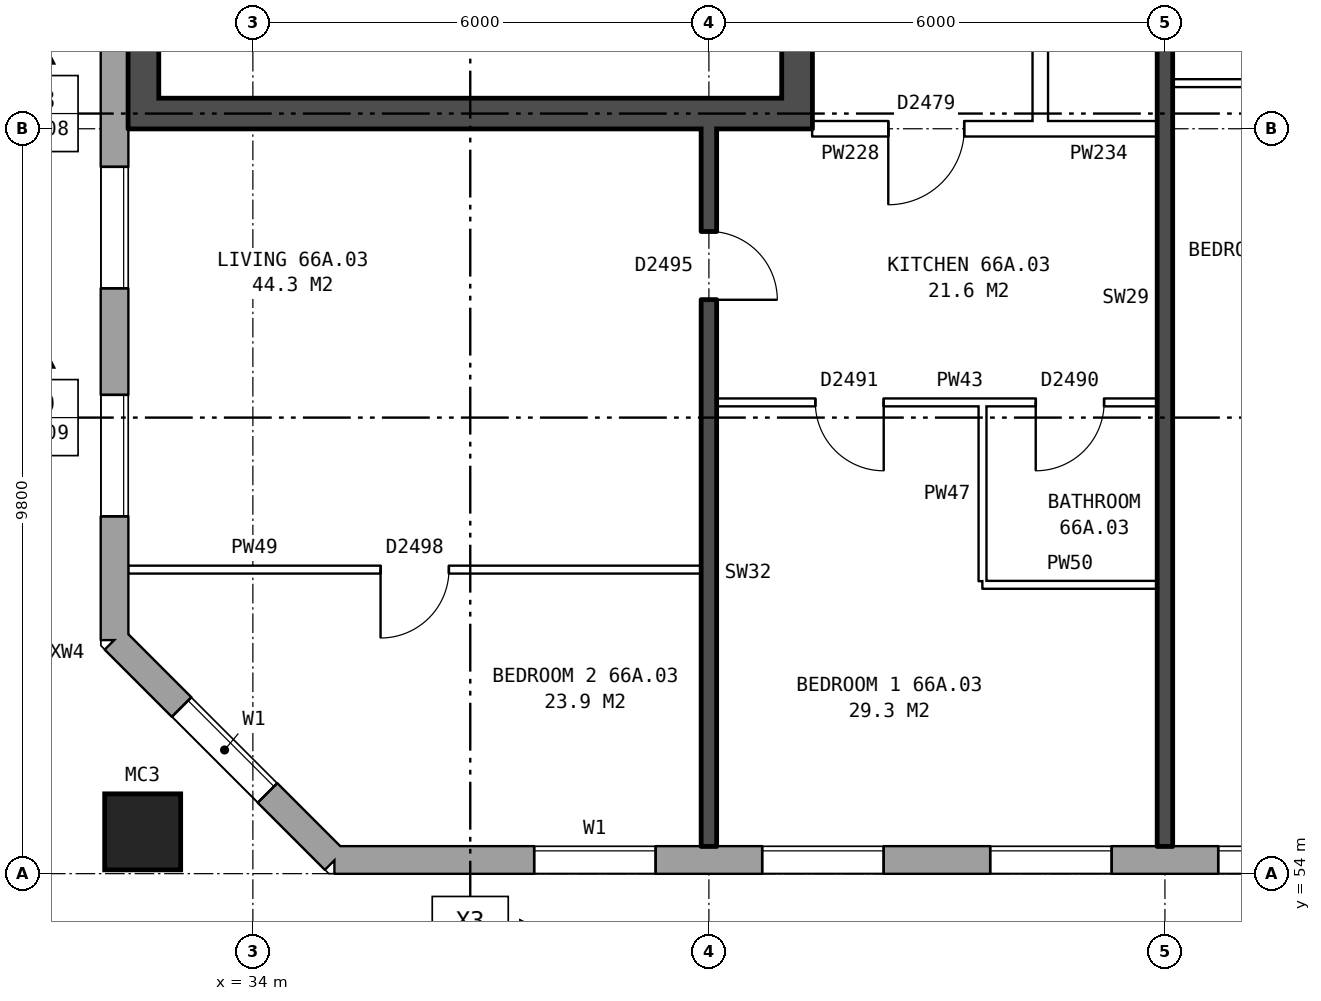
"""IFC4 building model, lengths in metres.
Left out: names, types, materials, properties, quantities, classifications, styles, units other than length and angle.
Written with IfcOpenShell. Run it as: python <this file> out.ifc"""

import sys

from ifc_helpers import new_model, si_unit, direction, frame, frame_2d, origin, origin_2d, place, context, subcontext, project, spatial, rectangle, hollow_rectangle, extrude, element, fill, save


model = new_model("IFC4")
c1 = context("Model", 3, precision=1e-05, world=origin(), true_north=direction((0.0, 1.0)))
c2 = subcontext(c1, "Body", "Model", "MODEL_VIEW")
j1 = project(units=[si_unit("LENGTHUNIT", "METRE"), si_unit("PLANEANGLEUNIT", "RADIAN")], contexts=[c1])
p1 = place(None, origin())
s1 = spatial("IfcSite", under=j1, at=p1, CompositionType="ELEMENT")
p2 = place(p1, origin())
s2 = spatial("IfcBuilding", under=s1, at=p2, CompositionType="ELEMENT")
p3 = place(p2, frame((0.0, 0.0, 233.8)))
s3 = spatial("IfcBuildingStorey", under=s2, at=p3, CompositionType="ELEMENT", Elevation=233.8)
p4 = place(p3, frame((32.55, 54.55, 0.0), z_axis=(0.0, 0.0, 1.0), x_axis=(1.0, 0.0, 0.0)))
e1 = element("IfcColumn", 1, at=p4, inside=s3, PredefinedType="COLUMN", context=c2, shape_type="SweptSolid", body=[
    extrude(hollow_rectangle(XDim=1.0, YDim=1.0, WallThickness=0.055, at=origin_2d()), origin(), (0.0, 0.0, 1.0), 3.1),
])
p5 = place(p3, frame((32.18, 57.075, 0.0), z_axis=(0.0, 0.0, 1.0), x_axis=(0.707106781187, -0.707106781187, 0.0)))
e2 = element("IfcWall", 2, at=p5, inside=s3, PredefinedType="STANDARD", context=c2, shape_type="SweptSolid", body=[
    extrude(rectangle(XDim=4.094, YDim=0.36, at=frame_2d((2.047, 0.0))), origin(), (0.0, 0.0, 1.0), 2.85),
])
p6 = place(p5, frame((1.247, 0.0, 0.8)))
e3 = element("IfcOpeningElement", 3, at=p6, cuts=e2, PredefinedType="OPENING", context=c2, shape_type="SweptSolid", body=[
    extrude(rectangle(XDim=1.6, YDim=1.8, at=frame_2d((0.8, 0.9))), frame((0.0, 0.19, 0.0), z_axis=(0.0, -1.0, 0.0), x_axis=(1.0, 0.0, 0.0)), (0.0, 0.0, 1.0), 0.38),
])
p7 = place(p3, frame((35.075, 54.18, 0.0), z_axis=(0.0, 0.0, 1.0), x_axis=(1.0, 0.0, 0.0)))
e4 = element("IfcWall", 4, at=p7, inside=s3, PredefinedType="STANDARD", context=c2, shape_type="SweptSolid", body=[
    extrude(rectangle(XDim=39.875, YDim=0.36, at=frame_2d((19.938, 0.0))), origin(), (0.0, 0.0, 1.0), 2.85),
])
p8 = place(p7, frame((2.625, 0.0, 0.8)))
e5 = element("IfcOpeningElement", 5, at=p8, cuts=e4, PredefinedType="OPENING", context=c2, shape_type="SweptSolid", body=[
    extrude(rectangle(XDim=1.6, YDim=1.8, at=frame_2d((0.8, 0.9))), frame((0.0, 0.19, 0.0), z_axis=(0.0, -1.0, 0.0), x_axis=(1.0, 0.0, 0.0)), (0.0, 0.0, 1.0), 0.38),
])
p9 = place(p7, frame((5.625, 0.0, 0.8)))
e6 = element("IfcOpeningElement", 6, at=p9, cuts=e4, PredefinedType="OPENING", context=c2, shape_type="SweptSolid", body=[
    extrude(rectangle(XDim=1.6, YDim=1.8, at=frame_2d((0.8, 0.9))), frame((0.0, 0.19, 0.0), z_axis=(0.0, -1.0, 0.0), x_axis=(1.0, 0.0, 0.0)), (0.0, 0.0, 1.0), 0.38),
])
p10 = place(p7, frame((8.625, 0.0, 0.8)))
e7 = element("IfcOpeningElement", 7, at=p10, cuts=e4, PredefinedType="OPENING", context=c2, shape_type="SweptSolid", body=[
    extrude(rectangle(XDim=1.6, YDim=1.8, at=frame_2d((0.8, 0.9))), frame((0.0, 0.19, 0.0), z_axis=(0.0, -1.0, 0.0), x_axis=(1.0, 0.0, 0.0)), (0.0, 0.0, 1.0), 0.38),
])
p11 = place(p7, frame((11.625, 0.0, 0.8)))
e8 = element("IfcOpeningElement", 8, at=p11, cuts=e4, PredefinedType="OPENING", context=c2, shape_type="SweptSolid", body=[
    extrude(rectangle(XDim=1.6, YDim=1.8, at=frame_2d((0.8, 0.9))), frame((0.0, 0.19, 0.0), z_axis=(0.0, -1.0, 0.0), x_axis=(1.0, 0.0, 0.0)), (0.0, 0.0, 1.0), 0.38),
])
p12 = place(p7, frame((14.625, 0.0, 0.8)))
e9 = element("IfcOpeningElement", 9, at=p12, cuts=e4, PredefinedType="OPENING", context=c2, shape_type="SweptSolid", body=[
    extrude(rectangle(XDim=1.6, YDim=1.8, at=frame_2d((0.8, 0.9))), frame((0.0, 0.19, 0.0), z_axis=(0.0, -1.0, 0.0), x_axis=(1.0, 0.0, 0.0)), (0.0, 0.0, 1.0), 0.38),
])
p13 = place(p7, frame((18.475, 0.0, 0.15)))
e10 = element("IfcOpeningElement", 10, at=p13, cuts=e4, PredefinedType="OPENING", context=c2, shape_type="SweptSolid", body=[
    extrude(rectangle(XDim=0.8, YDim=0.9, at=frame_2d((0.4, 0.45))), frame((0.0, 0.19, 0.0), z_axis=(0.0, -1.0, 0.0), x_axis=(1.0, 0.0, 0.0)), (0.0, 0.0, 1.0), 0.38),
])
p14 = place(p7, frame((20.625, 0.0, 0.8)))
e11 = element("IfcOpeningElement", 11, at=p14, cuts=e4, PredefinedType="OPENING", context=c2, shape_type="SweptSolid", body=[
    extrude(rectangle(XDim=1.6, YDim=1.8, at=frame_2d((0.8, 0.9))), frame((0.0, 0.19, 0.0), z_axis=(0.0, -1.0, 0.0), x_axis=(1.0, 0.0, 0.0)), (0.0, 0.0, 1.0), 0.38),
])
p15 = place(p7, frame((23.625, 0.0, 0.8)))
e12 = element("IfcOpeningElement", 12, at=p15, cuts=e4, PredefinedType="OPENING", context=c2, shape_type="SweptSolid", body=[
    extrude(rectangle(XDim=1.6, YDim=1.8, at=frame_2d((0.8, 0.9))), frame((0.0, 0.19, 0.0), z_axis=(0.0, -1.0, 0.0), x_axis=(1.0, 0.0, 0.0)), (0.0, 0.0, 1.0), 0.38),
])
p16 = place(p7, frame((26.625, 0.0, 0.8)))
e13 = element("IfcOpeningElement", 13, at=p16, cuts=e4, PredefinedType="OPENING", context=c2, shape_type="SweptSolid", body=[
    extrude(rectangle(XDim=1.6, YDim=1.8, at=frame_2d((0.8, 0.9))), frame((0.0, 0.19, 0.0), z_axis=(0.0, -1.0, 0.0), x_axis=(1.0, 0.0, 0.0)), (0.0, 0.0, 1.0), 0.38),
])
p17 = place(p7, frame((29.625, 0.0, 0.8)))
e14 = element("IfcOpeningElement", 14, at=p17, cuts=e4, PredefinedType="OPENING", context=c2, shape_type="SweptSolid", body=[
    extrude(rectangle(XDim=1.6, YDim=1.8, at=frame_2d((0.8, 0.9))), frame((0.0, 0.19, 0.0), z_axis=(0.0, -1.0, 0.0), x_axis=(1.0, 0.0, 0.0)), (0.0, 0.0, 1.0), 0.38),
])
p18 = place(p7, frame((32.625, 0.0, 0.8)))
e15 = element("IfcOpeningElement", 15, at=p18, cuts=e4, PredefinedType="OPENING", context=c2, shape_type="SweptSolid", body=[
    extrude(rectangle(XDim=1.6, YDim=1.8, at=frame_2d((0.8, 0.9))), frame((0.0, 0.19, 0.0), z_axis=(0.0, -1.0, 0.0), x_axis=(1.0, 0.0, 0.0)), (0.0, 0.0, 1.0), 0.38),
])
p19 = place(p7, frame((35.625, 0.0, 0.8)))
e16 = element("IfcOpeningElement", 16, at=p19, cuts=e4, PredefinedType="OPENING", context=c2, shape_type="SweptSolid", body=[
    extrude(rectangle(XDim=1.6, YDim=1.8, at=frame_2d((0.8, 0.9))), frame((0.0, 0.19, 0.0), z_axis=(0.0, -1.0, 0.0), x_axis=(1.0, 0.0, 0.0)), (0.0, 0.0, 1.0), 0.38),
])
p20 = place(p3, frame((32.18, 82.925, 0.0), z_axis=(0.0, 0.0, 1.0), x_axis=(0.0, -1.0, 0.0)))
e17 = element("IfcWall", 17, at=p20, inside=s3, PredefinedType="STANDARD", context=c2, shape_type="SweptSolid", body=[
    extrude(rectangle(XDim=25.851, YDim=0.36, at=frame_2d((12.925, 0.0))), origin(), (0.0, 0.0, 1.0), 2.85),
])
p21 = place(p20, frame((1.625, 0.0, 0.8)))
e18 = element("IfcOpeningElement", 18, at=p21, cuts=e17, PredefinedType="OPENING", context=c2, shape_type="SweptSolid", body=[
    extrude(rectangle(XDim=1.6, YDim=1.8, at=frame_2d((0.8, 0.9))), frame((0.0, 0.19, 0.0), z_axis=(0.0, -1.0, 0.0), x_axis=(1.0, 0.0, 0.0)), (0.0, 0.0, 1.0), 0.38),
])
p22 = place(p20, frame((4.625, 0.0, 0.8)))
e19 = element("IfcOpeningElement", 19, at=p22, cuts=e17, PredefinedType="OPENING", context=c2, shape_type="SweptSolid", body=[
    extrude(rectangle(XDim=1.6, YDim=1.8, at=frame_2d((0.8, 0.9))), frame((0.0, 0.19, 0.0), z_axis=(0.0, -1.0, 0.0), x_axis=(1.0, 0.0, 0.0)), (0.0, 0.0, 1.0), 0.38),
])
p23 = place(p20, frame((19.625, 0.0, 0.8)))
e20 = element("IfcOpeningElement", 20, at=p23, cuts=e17, PredefinedType="OPENING", context=c2, shape_type="SweptSolid", body=[
    extrude(rectangle(XDim=1.6, YDim=1.8, at=frame_2d((0.8, 0.9))), frame((0.0, 0.19, 0.0), z_axis=(0.0, -1.0, 0.0), x_axis=(1.0, 0.0, 0.0)), (0.0, 0.0, 1.0), 0.38),
])
p24 = place(p20, frame((22.625, 0.0, 0.8)))
e21 = element("IfcOpeningElement", 21, at=p24, cuts=e17, PredefinedType="OPENING", context=c2, shape_type="SweptSolid", body=[
    extrude(rectangle(XDim=1.6, YDim=1.8, at=frame_2d((0.8, 0.9))), frame((0.0, 0.19, 0.0), z_axis=(0.0, -1.0, 0.0), x_axis=(1.0, 0.0, 0.0)), (0.0, 0.0, 1.0), 0.38),
])
p25 = place(p3, frame((41.16, 76.2, 0.0), z_axis=(0.0, 0.0, 1.0), x_axis=(0.0, -1.0, 0.0)))
e22 = element("IfcWall", 22, at=p25, inside=s3, PredefinedType="SHEAR", context=c2, shape_type="SweptSolid", body=[
    extrude(rectangle(XDim=12.4, YDim=0.4, at=frame_2d((6.2, 0.0))), origin(), (0.0, 0.0, 1.0), 2.85),
])
p26 = place(p25, frame((1.325, 0.0, 0.0)))
e23 = element("IfcOpeningElement", 23, at=p26, cuts=e22, PredefinedType="OPENING", context=c2, shape_type="SweptSolid", body=[
    extrude(rectangle(XDim=1.1, YDim=2.1, at=frame_2d((0.55, 1.05))), frame((0.0, 0.21, 0.0), z_axis=(0.0, -1.0, 0.0), x_axis=(1.0, 0.0, 0.0)), (0.0, 0.0, 1.0), 0.42),
])
p27 = place(p25, frame((4.225, 0.0, 0.0)))
e24 = element("IfcOpeningElement", 24, at=p27, cuts=e22, PredefinedType="OPENING", context=c2, shape_type="SweptSolid", body=[
    extrude(rectangle(XDim=0.85, YDim=2.1, at=frame_2d((0.425, 1.05))), frame((0.0, 0.21, 0.0), z_axis=(0.0, -1.0, 0.0), x_axis=(1.0, 0.0, 0.0)), (0.0, 0.0, 1.0), 0.42),
])
p28 = place(p25, frame((7.475, 0.0, 0.0)))
e25 = element("IfcOpeningElement", 25, at=p28, cuts=e22, PredefinedType="OPENING", context=c2, shape_type="SweptSolid", body=[
    extrude(rectangle(XDim=0.85, YDim=2.1, at=frame_2d((0.425, 1.05))), frame((0.0, 0.21, 0.0), z_axis=(0.0, -1.0, 0.0), x_axis=(1.0, 0.0, 0.0)), (0.0, 0.0, 1.0), 0.42),
])
p29 = place(p25, frame((9.9, 0.0, 0.0)))
e26 = element("IfcOpeningElement", 26, at=p29, cuts=e22, PredefinedType="OPENING", context=c2, shape_type="SweptSolid", body=[
    extrude(rectangle(XDim=1.1, YDim=2.1, at=frame_2d((0.55, 1.05))), frame((0.0, 0.21, 0.0), z_axis=(0.0, -1.0, 0.0), x_axis=(1.0, 0.0, 0.0)), (0.0, 0.0, 1.0), 0.42),
])
p30 = place(p3, frame((32.56, 76.2, 0.0), z_axis=(0.0, 0.0, 1.0), x_axis=(0.0, -1.0, 0.0)))
e27 = element("IfcWall", 27, at=p30, inside=s3, PredefinedType="SHEAR", context=c2, shape_type="SweptSolid", body=[
    extrude(rectangle(XDim=12.4, YDim=0.4, at=frame_2d((6.2, 0.0))), origin(), (0.0, 0.0, 1.0), 2.85),
])
p31 = place(p3, frame((40.96, 64.0, 0.0), z_axis=(0.0, 0.0, 1.0), x_axis=(-1.0, 0.0, 0.0)))
e28 = element("IfcWall", 28, at=p31, inside=s3, PredefinedType="SHEAR", context=c2, shape_type="SweptSolid", body=[
    extrude(rectangle(XDim=8.2, YDim=0.4, at=frame_2d((4.1, 0.0))), origin(), (0.0, 0.0, 1.0), 2.85),
])
p32 = place(p3, frame((44.36, 63.9, 0.0), z_axis=(0.0, 0.0, 1.0), x_axis=(0.0, 1.0, 0.0)))
e29 = element("IfcWall", 29, at=p32, inside=s3, PredefinedType="PARTITIONING", context=c2, shape_type="SweptSolid", body=[
    extrude(rectangle(XDim=12.2, YDim=0.2, at=frame_2d((6.1, 0.0))), origin(), (0.0, 0.0, 1.0), 2.85),
])
p33 = place(p32, frame((5.1, 0.0, 0.0)))
e30 = element("IfcOpeningElement", 30, at=p33, cuts=e29, PredefinedType="OPENING", context=c2, shape_type="SweptSolid", body=[
    extrude(rectangle(XDim=2.0, YDim=2.1, at=frame_2d((1.0, 1.05))), frame((0.0, 0.11, 0.0), z_axis=(0.0, -1.0, 0.0), x_axis=(1.0, 0.0, 0.0)), (0.0, 0.0, 1.0), 0.22),
])
p34 = place(p3, frame((43.6, 57.8, 0.0), z_axis=(0.0, 0.0, 1.0), x_axis=(1.0, 0.0, 0.0)))
e31 = element("IfcWall", 31, at=p34, inside=s3, PredefinedType="PARTITIONING", context=c2, shape_type="SweptSolid", body=[
    extrude(rectangle(XDim=2.3, YDim=0.1, at=frame_2d((1.15, 0.0))), origin(), (0.0, 0.0, 1.0), 2.85),
])
p35 = place(p3, frame((32.36, 58.0, 0.0), z_axis=(0.0, 0.0, 1.0), x_axis=(1.0, 0.0, 0.0)))
e32 = element("IfcWall", 32, at=p35, inside=s3, PredefinedType="PARTITIONING", context=c2, shape_type="SweptSolid", body=[
    extrude(rectangle(XDim=7.54, YDim=0.1, at=frame_2d((3.77, 0.0))), origin(), (0.0, 0.0, 1.0), 2.85),
])
p36 = place(p35, frame((3.32, 0.0, 0.0)))
e33 = element("IfcOpeningElement", 33, at=p36, cuts=e32, PredefinedType="OPENING", context=c2, shape_type="SweptSolid", body=[
    extrude(rectangle(XDim=0.9, YDim=2.1, at=frame_2d((0.45, 1.05))), frame((0.0, 0.06, 0.0), z_axis=(0.0, -1.0, 0.0), x_axis=(1.0, 0.0, 0.0)), (0.0, 0.0, 1.0), 0.12),
])
p37 = place(p3, frame((40.1, 60.2, 0.0), z_axis=(0.0, 0.0, 1.0), x_axis=(1.0, 0.0, 0.0)))
e34 = element("IfcWall", 34, at=p37, inside=s3, PredefinedType="PARTITIONING", context=c2, shape_type="SweptSolid", body=[
    extrude(rectangle(XDim=5.8, YDim=0.1, at=frame_2d((2.9, 0.0))), origin(), (0.0, 0.0, 1.0), 2.85),
])
p38 = place(p37, frame((1.3, 0.0, 0.0)))
e35 = element("IfcOpeningElement", 35, at=p38, cuts=e34, PredefinedType="OPENING", context=c2, shape_type="SweptSolid", body=[
    extrude(rectangle(XDim=0.9, YDim=2.1, at=frame_2d((0.45, 1.05))), frame((0.0, 0.06, 0.0), z_axis=(0.0, -1.0, 0.0), x_axis=(1.0, 0.0, 0.0)), (0.0, 0.0, 1.0), 0.12),
])
p39 = place(p37, frame((4.2, 0.0, 0.0)))
e36 = element("IfcOpeningElement", 36, at=p39, cuts=e34, PredefinedType="OPENING", context=c2, shape_type="SweptSolid", body=[
    extrude(rectangle(XDim=0.9, YDim=2.1, at=frame_2d((0.45, 1.05))), frame((0.0, 0.06, 0.0), z_axis=(0.0, -1.0, 0.0), x_axis=(1.0, 0.0, 0.0)), (0.0, 0.0, 1.0), 0.12),
])
p40 = place(p3, frame((41.36, 63.8, 0.0), z_axis=(0.0, 0.0, 1.0), x_axis=(1.0, 0.0, 0.0)))
e37 = element("IfcWall", 37, at=p40, inside=s3, PredefinedType="PARTITIONING", context=c2, shape_type="SweptSolid", body=[
    extrude(rectangle(XDim=3.0, YDim=0.2, at=frame_2d((1.5, 0.0))), origin(), (0.0, 0.0, 1.0), 2.85),
])
p41 = place(p40, frame((1.0, 0.0, 0.0)))
e38 = element("IfcOpeningElement", 38, at=p41, cuts=e37, PredefinedType="OPENING", context=c2, shape_type="SweptSolid", body=[
    extrude(rectangle(XDim=1.0, YDim=2.1, at=frame_2d((0.5, 1.05))), frame((0.0, 0.11, 0.0), z_axis=(0.0, -1.0, 0.0), x_axis=(1.0, 0.0, 0.0)), (0.0, 0.0, 1.0), 0.22),
])
p42 = place(p3, frame((44.36, 63.8, 0.0), z_axis=(0.0, 0.0, 1.0), x_axis=(1.0, 0.0, 0.0)))
e39 = element("IfcWall", 39, at=p42, inside=s3, PredefinedType="PARTITIONING", context=c2, shape_type="SweptSolid", body=[
    extrude(rectangle(XDim=1.54, YDim=0.2, at=frame_2d((0.77, 0.0))), origin(), (0.0, 0.0, 1.0), 2.85),
])
p43 = place(p3, frame((46.1, 64.4, 0.0), z_axis=(0.0, 0.0, 1.0), x_axis=(1.0, 0.0, 0.0)))
e40 = element("IfcWall", 40, at=p43, inside=s3, PredefinedType="PARTITIONING", context=c2, shape_type="SweptSolid", body=[
    extrude(rectangle(XDim=2.9, YDim=0.1, at=frame_2d((1.45, 0.0))), origin(), (0.0, 0.0, 1.0), 2.85),
])
p44 = place(p3, frame((40.0, 54.36, 0.0), z_axis=(0.0, 0.0, 1.0), x_axis=(0.0, 1.0, 0.0)))
e41 = element("IfcWall", 41, at=p44, inside=s3, PredefinedType="SOLIDWALL", context=c2, shape_type="SweptSolid", body=[
    extrude(rectangle(XDim=9.44, YDim=0.2, at=frame_2d((4.72, 0.0))), origin(), (0.0, 0.0, 1.0), 2.85),
])
p45 = place(p44, frame((7.19, 0.0, 0.0)))
e42 = element("IfcOpeningElement", 42, at=p45, cuts=e41, PredefinedType="OPENING", context=c2, shape_type="SweptSolid", body=[
    extrude(rectangle(XDim=0.9, YDim=2.1, at=frame_2d((0.45, 1.05))), frame((0.0, 0.11, 0.0), z_axis=(0.0, -1.0, 0.0), x_axis=(1.0, 0.0, 0.0)), (0.0, 0.0, 1.0), 0.22),
])
p46 = place(p3, frame((43.6, 57.85, 0.0), z_axis=(0.0, 0.0, 1.0), x_axis=(0.0, 1.0, 0.0)))
e43 = element("IfcWall", 43, at=p46, inside=s3, PredefinedType="PARTITIONING", context=c2, shape_type="SweptSolid", body=[
    extrude(rectangle(XDim=2.3, YDim=0.1, at=frame_2d((1.15, 0.0))), origin(), (0.0, 0.0, 1.0), 2.85),
])
p47 = place(p3, frame((46.0, 54.36, 0.0), z_axis=(0.0, 0.0, 1.0), x_axis=(0.0, 1.0, 0.0)))
e44 = element("IfcWall", 44, at=p47, inside=s3, PredefinedType="SOLIDWALL", context=c2, shape_type="SweptSolid", body=[
    extrude(rectangle(XDim=14.44, YDim=0.2, at=frame_2d((7.22, 0.0))), origin(), (0.0, 0.0, 1.0), 2.85),
])
p48 = place(p6, origin())
e45 = element("IfcWindow", 45, at=p48, inside=s3, PartitioningType="SINGLE_PANEL", PredefinedType="WINDOW", context=c2, shape_type="SweptSolid", body=[
    extrude(rectangle(XDim=1.6, YDim=1.8, at=frame_2d((0.8, 0.9))), frame((0.0, 0.15, 0.0), z_axis=(0.0, -1.0, 0.0), x_axis=(1.0, 0.0, 0.0)), (0.0, 0.0, 1.0), 0.06),
])
fill(e3, e45)
p49 = place(p8, origin())
e46 = element("IfcWindow", 46, at=p49, inside=s3, PartitioningType="SINGLE_PANEL", PredefinedType="WINDOW", context=c2, shape_type="SweptSolid", body=[
    extrude(rectangle(XDim=1.6, YDim=1.8, at=frame_2d((0.8, 0.9))), frame((0.0, 0.15, 0.0), z_axis=(0.0, -1.0, 0.0), x_axis=(1.0, 0.0, 0.0)), (0.0, 0.0, 1.0), 0.06),
])
fill(e5, e46)
p50 = place(p9, origin())
e47 = element("IfcWindow", 47, at=p50, inside=s3, PartitioningType="SINGLE_PANEL", PredefinedType="WINDOW", context=c2, shape_type="SweptSolid", body=[
    extrude(rectangle(XDim=1.6, YDim=1.8, at=frame_2d((0.8, 0.9))), frame((0.0, 0.15, 0.0), z_axis=(0.0, -1.0, 0.0), x_axis=(1.0, 0.0, 0.0)), (0.0, 0.0, 1.0), 0.06),
])
fill(e6, e47)
p51 = place(p10, origin())
e48 = element("IfcWindow", 48, at=p51, inside=s3, PartitioningType="SINGLE_PANEL", PredefinedType="WINDOW", context=c2, shape_type="SweptSolid", body=[
    extrude(rectangle(XDim=1.6, YDim=1.8, at=frame_2d((0.8, 0.9))), frame((0.0, 0.15, 0.0), z_axis=(0.0, -1.0, 0.0), x_axis=(1.0, 0.0, 0.0)), (0.0, 0.0, 1.0), 0.06),
])
fill(e7, e48)
p52 = place(p11, origin())
e49 = element("IfcWindow", 49, at=p52, inside=s3, PartitioningType="SINGLE_PANEL", PredefinedType="WINDOW", context=c2, shape_type="SweptSolid", body=[
    extrude(rectangle(XDim=1.6, YDim=1.8, at=frame_2d((0.8, 0.9))), frame((0.0, 0.15, 0.0), z_axis=(0.0, -1.0, 0.0), x_axis=(1.0, 0.0, 0.0)), (0.0, 0.0, 1.0), 0.06),
])
fill(e8, e49)
p53 = place(p23, origin())
e50 = element("IfcWindow", 50, at=p53, inside=s3, PartitioningType="SINGLE_PANEL", PredefinedType="WINDOW", context=c2, shape_type="SweptSolid", body=[
    extrude(rectangle(XDim=1.6, YDim=1.8, at=frame_2d((0.8, 0.9))), frame((0.0, 0.15, 0.0), z_axis=(0.0, -1.0, 0.0), x_axis=(1.0, 0.0, 0.0)), (0.0, 0.0, 1.0), 0.06),
])
fill(e20, e50)
p54 = place(p24, origin())
e51 = element("IfcWindow", 51, at=p54, inside=s3, PartitioningType="SINGLE_PANEL", PredefinedType="WINDOW", context=c2, shape_type="SweptSolid", body=[
    extrude(rectangle(XDim=1.6, YDim=1.8, at=frame_2d((0.8, 0.9))), frame((0.0, 0.15, 0.0), z_axis=(0.0, -1.0, 0.0), x_axis=(1.0, 0.0, 0.0)), (0.0, 0.0, 1.0), 0.06),
])
fill(e21, e51)
p55 = place(p38, frame((0.9, 0.0, 0.0), z_axis=(0.0, 0.0, 1.0), x_axis=(-1.0, 0.0, 0.0)))
e52 = element("IfcDoor", 52, at=p55, inside=s3, OperationType="SINGLE_SWING_LEFT", PredefinedType="DOOR", context=c2, shape_type="SweptSolid", body=[
    extrude(rectangle(XDim=0.9, YDim=2.1, at=frame_2d((0.45, 1.05))), frame((0.0, 0.025, 0.0), z_axis=(0.0, -1.0, 0.0), x_axis=(1.0, 0.0, 0.0)), (0.0, 0.0, 1.0), 0.05),
])
fill(e35, e52)
p56 = place(p36, frame((0.9, 0.0, 0.0), z_axis=(0.0, 0.0, 1.0), x_axis=(-1.0, 0.0, 0.0)))
e53 = element("IfcDoor", 53, at=p56, inside=s3, OperationType="SINGLE_SWING_RIGHT", PredefinedType="DOOR", context=c2, shape_type="SweptSolid", body=[
    extrude(rectangle(XDim=0.9, YDim=2.1, at=frame_2d((0.45, 1.05))), frame((0.0, 0.025, 0.0), z_axis=(0.0, -1.0, 0.0), x_axis=(1.0, 0.0, 0.0)), (0.0, 0.0, 1.0), 0.05),
])
fill(e33, e53)
p57 = place(p41, frame((1.0, 0.0, 0.0), z_axis=(0.0, 0.0, 1.0), x_axis=(-1.0, 0.0, 0.0)))
e54 = element("IfcDoor", 54, at=p57, inside=s3, OperationType="SINGLE_SWING_RIGHT", PredefinedType="DOOR", context=c2, shape_type="SweptSolid", body=[
    extrude(rectangle(XDim=1.0, YDim=2.1, at=frame_2d((0.5, 1.05))), frame((0.0, 0.025, 0.0), z_axis=(0.0, -1.0, 0.0), x_axis=(1.0, 0.0, 0.0)), (0.0, 0.0, 1.0), 0.05),
])
fill(e38, e54)
p58 = place(p45, frame((0.9, 0.0, 0.0), z_axis=(0.0, 0.0, 1.0), x_axis=(-1.0, 0.0, 0.0)))
e55 = element("IfcDoor", 55, at=p58, inside=s3, OperationType="SINGLE_SWING_RIGHT", PredefinedType="DOOR", context=c2, shape_type="SweptSolid", body=[
    extrude(rectangle(XDim=0.9, YDim=2.1, at=frame_2d((0.45, 1.05))), frame((0.0, 0.025, 0.0), z_axis=(0.0, -1.0, 0.0), x_axis=(1.0, 0.0, 0.0)), (0.0, 0.0, 1.0), 0.05),
])
fill(e42, e55)
p59 = place(p39, frame((0.9, 0.0, 0.0), z_axis=(0.0, 0.0, 1.0), x_axis=(-1.0, 0.0, 0.0)))
e56 = element("IfcDoor", 56, at=p59, inside=s3, OperationType="SINGLE_SWING_RIGHT", PredefinedType="DOOR", context=c2, shape_type="SweptSolid", body=[
    extrude(rectangle(XDim=0.9, YDim=2.1, at=frame_2d((0.45, 1.05))), frame((0.0, 0.025, 0.0), z_axis=(0.0, -1.0, 0.0), x_axis=(1.0, 0.0, 0.0)), (0.0, 0.0, 1.0), 0.05),
])
fill(e36, e56)
save(model, sys.argv[1])
